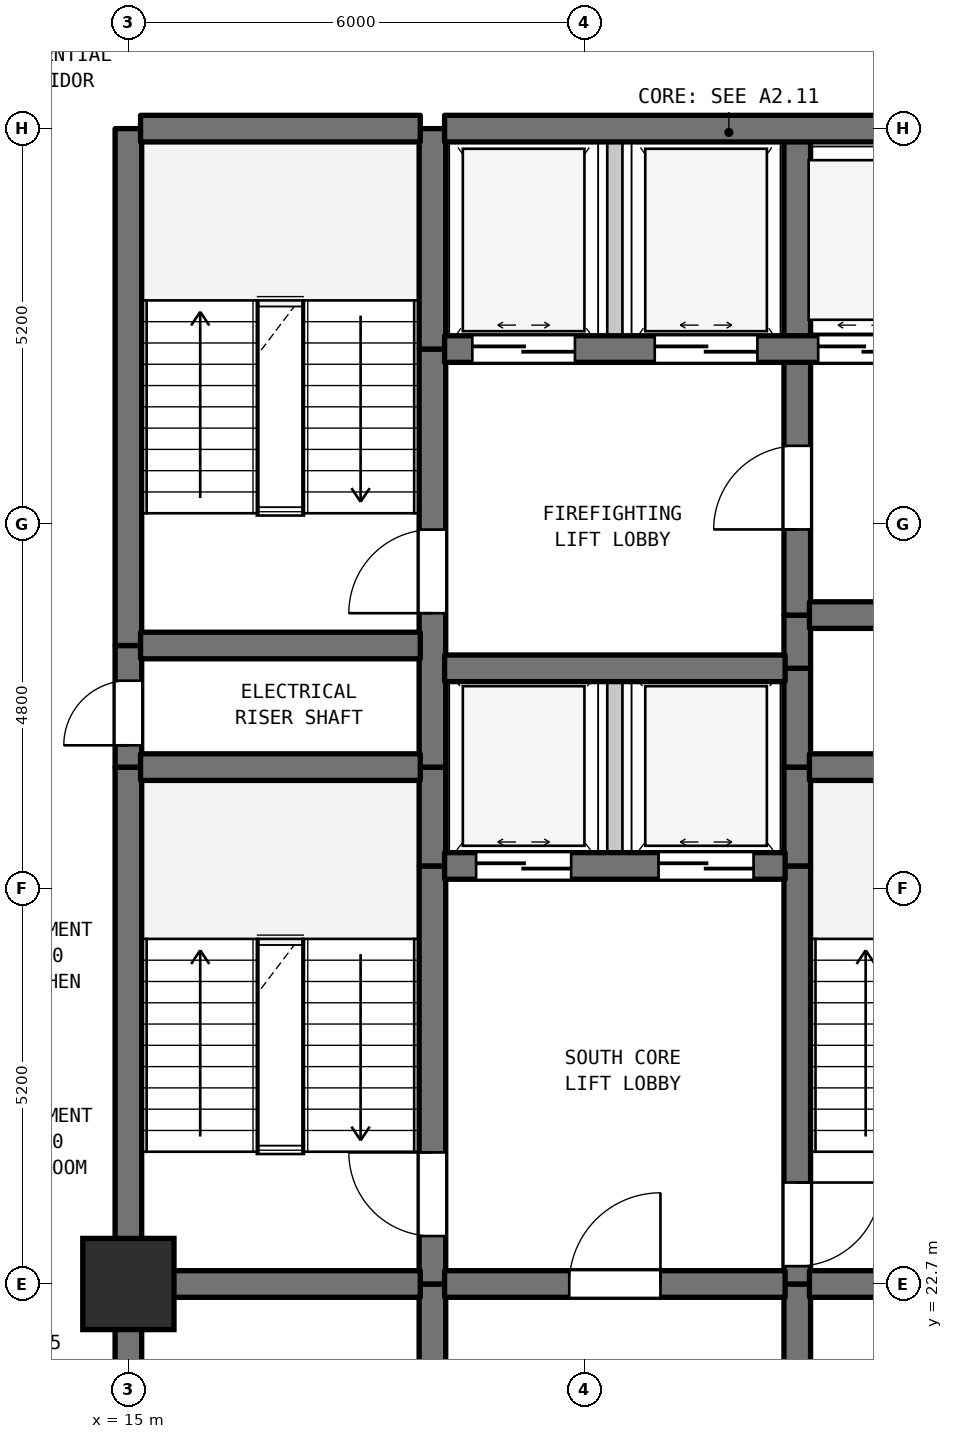
"""IFC4 building model, lengths in metres.
Left out: names, types, materials, properties, quantities, classifications, styles, units other than length and angle.
Written with IfcOpenShell. Run it as: python <this file> out.ifc"""

import sys

from ifc_helpers import new_model, si_unit, direction, frame, frame_2d, origin, origin_2d, place, context, subcontext, project, spatial, rectangle, extrude, element, fill, save


model = new_model("IFC4")
c1 = context("Model", 3, precision=1e-05, world=origin(), true_north=direction((0.0, 1.0)))
c2 = subcontext(c1, "Body", "Model", "MODEL_VIEW")
j1 = project(units=[si_unit("LENGTHUNIT", "METRE"), si_unit("PLANEANGLEUNIT", "RADIAN")], contexts=[c1])
p1 = place(None, origin())
s1 = spatial("IfcSite", under=j1, at=p1, CompositionType="ELEMENT")
p2 = place(p1, origin())
s2 = spatial("IfcBuilding", under=s1, at=p2, CompositionType="ELEMENT")
p3 = place(p2, frame((0.0, 0.0, 73.8)))
s3 = spatial("IfcBuildingStorey", under=s2, at=p3, CompositionType="ELEMENT", Elevation=73.8)
p4 = place(p3, frame((15.0, 22.7, 0.0), z_axis=(0.0, 0.0, 1.0), x_axis=(1.0, 0.0, 0.0)))
e1 = element("IfcColumn", 1, at=p4, inside=s3, PredefinedType="COLUMN", context=c2, shape_type="SweptSolid", body=[
    extrude(rectangle(XDim=1.2, YDim=1.2, at=origin_2d()), origin(), (0.0, 0.0, 1.0), 3.7),
])
p5 = place(p3, frame((15.0, 19.5, 0.0), z_axis=(0.0, 0.0, 1.0), x_axis=(0.0, 1.0, 0.0)))
e2 = element("IfcWall", 2, at=p5, inside=s3, PredefinedType="SHEAR", context=c2, shape_type="SweptSolid", body=[
    extrude(rectangle(XDim=3.2, YDim=0.35, at=frame_2d((1.6, 0.0))), origin(), (0.0, 0.0, 1.0), 3.385),
])
p6 = place(p3, frame((15.0, 22.7, 0.0), z_axis=(0.0, 0.0, 1.0), x_axis=(0.0, 1.0, 0.0)))
e3 = element("IfcWall", 3, at=p6, inside=s3, PredefinedType="SHEAR", context=c2, shape_type="SweptSolid", body=[
    extrude(rectangle(XDim=6.8, YDim=0.35, at=frame_2d((3.4, 0.0))), origin(), (0.0, 0.0, 1.0), 3.385),
])
p7 = place(p3, frame((15.0, 29.5, 0.0), z_axis=(0.0, 0.0, 1.0), x_axis=(0.0, 1.0, 0.0)))
e4 = element("IfcWall", 4, at=p7, inside=s3, PredefinedType="SHEAR", context=c2, shape_type="SweptSolid", body=[
    extrude(rectangle(XDim=1.6, YDim=0.35, at=frame_2d((0.8, 0.0))), origin(), (0.0, 0.0, 1.0), 3.385),
])
p8 = place(p7, frame((0.287, 0.0, 0.0)))
e5 = element("IfcOpeningElement", 5, at=p8, cuts=e4, PredefinedType="OPENING", context=c2, shape_type="SweptSolid", body=[
    extrude(rectangle(XDim=0.85, YDim=2.1, at=frame_2d((0.425, 1.05))), frame((0.0, 0.185, 0.0), z_axis=(0.0, -1.0, 0.0), x_axis=(1.0, 0.0, 0.0)), (0.0, 0.0, 1.0), 0.37),
])
p9 = place(p3, frame((15.0, 31.1, 0.0), z_axis=(0.0, 0.0, 1.0), x_axis=(0.0, 1.0, 0.0)))
e6 = element("IfcWall", 6, at=p9, inside=s3, PredefinedType="SHEAR", context=c2, shape_type="SweptSolid", body=[
    extrude(rectangle(XDim=6.8, YDim=0.35, at=frame_2d((3.4, 0.0))), origin(), (0.0, 0.0, 1.0), 3.385),
])
p10 = place(p3, frame((19.0, 19.5, 0.0), z_axis=(0.0, 0.0, 1.0), x_axis=(0.0, 1.0, 0.0)))
e7 = element("IfcWall", 7, at=p10, inside=s3, PredefinedType="SHEAR", context=c2, shape_type="SweptSolid", body=[
    extrude(rectangle(XDim=3.2, YDim=0.35, at=frame_2d((1.6, 0.0))), origin(), (0.0, 0.0, 1.0), 3.385),
])
p11 = place(p3, frame((19.0, 22.7, 0.0), z_axis=(0.0, 0.0, 1.0), x_axis=(0.0, 1.0, 0.0)))
e8 = element("IfcWall", 8, at=p11, inside=s3, PredefinedType="SHEAR", context=c2, shape_type="SweptSolid", body=[
    extrude(rectangle(XDim=5.5, YDim=0.35, at=frame_2d((2.75, 0.0))), origin(), (0.0, 0.0, 1.0), 3.385),
])
p12 = place(p11, frame((0.631, 0.0, 0.0)))
e9 = element("IfcOpeningElement", 9, at=p12, cuts=e8, PredefinedType="OPENING", context=c2, shape_type="SweptSolid", body=[
    extrude(rectangle(XDim=1.1, YDim=2.15, at=frame_2d((0.55, 1.075))), frame((0.0, 0.185, 0.0), z_axis=(0.0, -1.0, 0.0), x_axis=(1.0, 0.0, 0.0)), (0.0, 0.0, 1.0), 0.37),
])
p13 = place(p3, frame((19.0, 28.2, 0.0), z_axis=(0.0, 0.0, 1.0), x_axis=(0.0, 1.0, 0.0)))
e10 = element("IfcWall", 10, at=p13, inside=s3, PredefinedType="SHEAR", context=c2, shape_type="SweptSolid", body=[
    extrude(rectangle(XDim=1.3, YDim=0.35, at=frame_2d((0.65, 0.0))), origin(), (0.0, 0.0, 1.0), 3.385),
])
p14 = place(p3, frame((19.0, 29.5, 0.0), z_axis=(0.0, 0.0, 1.0), x_axis=(0.0, 1.0, 0.0)))
e11 = element("IfcWall", 11, at=p14, inside=s3, PredefinedType="SHEAR", context=c2, shape_type="SweptSolid", body=[
    extrude(rectangle(XDim=5.5, YDim=0.35, at=frame_2d((2.75, 0.0))), origin(), (0.0, 0.0, 1.0), 3.385),
])
p15 = place(p14, frame((2.025, 0.0, 0.0)))
e12 = element("IfcOpeningElement", 12, at=p15, cuts=e11, PredefinedType="OPENING", context=c2, shape_type="SweptSolid", body=[
    extrude(rectangle(XDim=1.1, YDim=2.15, at=frame_2d((0.55, 1.075))), frame((0.0, 0.185, 0.0), z_axis=(0.0, -1.0, 0.0), x_axis=(1.0, 0.0, 0.0)), (0.0, 0.0, 1.0), 0.37),
])
p16 = place(p3, frame((19.0, 35.0, 0.0), z_axis=(0.0, 0.0, 1.0), x_axis=(0.0, 1.0, 0.0)))
e13 = element("IfcWall", 13, at=p16, inside=s3, PredefinedType="SHEAR", context=c2, shape_type="SweptSolid", body=[
    extrude(rectangle(XDim=2.9, YDim=0.35, at=frame_2d((1.45, 0.0))), origin(), (0.0, 0.0, 1.0), 3.385),
])
p17 = place(p3, frame((21.4, 28.2, 0.0), z_axis=(0.0, 0.0, 1.0), x_axis=(0.0, 1.0, 0.0)))
e14 = element("IfcWall", 14, at=p17, inside=s3, PredefinedType="STANDARD", context=c2, shape_type="SweptSolid", body=[
    extrude(rectangle(XDim=2.6, YDim=0.2, at=frame_2d((1.3, 0.0))), origin(), (0.0, 0.0, 1.0), 3.385),
])
p18 = place(p3, frame((21.4, 35.0, 0.0), z_axis=(0.0, 0.0, 1.0), x_axis=(0.0, 1.0, 0.0)))
e15 = element("IfcWall", 15, at=p18, inside=s3, PredefinedType="STANDARD", context=c2, shape_type="SweptSolid", body=[
    extrude(rectangle(XDim=2.9, YDim=0.2, at=frame_2d((1.45, 0.0))), origin(), (0.0, 0.0, 1.0), 3.385),
])
p19 = place(p3, frame((23.8, 19.5, 0.0), z_axis=(0.0, 0.0, 1.0), x_axis=(0.0, 1.0, 0.0)))
e16 = element("IfcWall", 16, at=p19, inside=s3, PredefinedType="SHEAR", context=c2, shape_type="SweptSolid", body=[
    extrude(rectangle(XDim=3.2, YDim=0.35, at=frame_2d((1.6, 0.0))), origin(), (0.0, 0.0, 1.0), 3.385),
])
p20 = place(p3, frame((23.8, 22.7, 0.0), z_axis=(0.0, 0.0, 1.0), x_axis=(0.0, 1.0, 0.0)))
e17 = element("IfcWall", 17, at=p20, inside=s3, PredefinedType="SHEAR", context=c2, shape_type="SweptSolid", body=[
    extrude(rectangle(XDim=5.5, YDim=0.35, at=frame_2d((2.75, 0.0))), origin(), (0.0, 0.0, 1.0), 3.385),
])
p21 = place(p20, frame((0.235, 0.0, 0.0)))
e18 = element("IfcOpeningElement", 18, at=p21, cuts=e17, PredefinedType="OPENING", context=c2, shape_type="SweptSolid", body=[
    extrude(rectangle(XDim=1.1, YDim=2.15, at=frame_2d((0.55, 1.075))), frame((0.0, 0.185, 0.0), z_axis=(0.0, -1.0, 0.0), x_axis=(1.0, 0.0, 0.0)), (0.0, 0.0, 1.0), 0.37),
])
for number, where, z_axis, x_axis in (
    (19, (23.8, 28.2, 0.0), (0.0, 0.0, 1.0), (0.0, 1.0, 0.0)),
    (20, (23.8, 29.5, 0.0), (0.0, 0.0, 1.0), (0.0, 1.0, 0.0)),
):
    element("IfcWall", number, at=place(p3, frame(where, z_axis=z_axis, x_axis=x_axis)), inside=s3, PredefinedType="SHEAR", context=c2, shape_type="SweptSolid", body=[
        extrude(rectangle(XDim=1.3, YDim=0.35, at=frame_2d((0.65, 0.0))), origin(), (0.0, 0.0, 1.0), 3.385),
    ])
p22 = place(p3, frame((23.8, 30.8, 0.0), z_axis=(0.0, 0.0, 1.0), x_axis=(0.0, 1.0, 0.0)))
e21 = element("IfcWall", 21, at=p22, inside=s3, PredefinedType="SHEAR", context=c2, shape_type="SweptSolid", body=[
    extrude(rectangle(XDim=0.7, YDim=0.35, at=frame_2d((0.35, 0.0))), origin(), (0.0, 0.0, 1.0), 3.385),
])
p23 = place(p3, frame((23.8, 31.5, 0.0), z_axis=(0.0, 0.0, 1.0), x_axis=(0.0, 1.0, 0.0)))
e22 = element("IfcWall", 22, at=p23, inside=s3, PredefinedType="SHEAR", context=c2, shape_type="SweptSolid", body=[
    extrude(rectangle(XDim=3.5, YDim=0.35, at=frame_2d((1.75, 0.0))), origin(), (0.0, 0.0, 1.0), 3.385),
])
p24 = place(p23, frame((1.127, 0.0, 0.0)))
e23 = element("IfcOpeningElement", 23, at=p24, cuts=e22, PredefinedType="OPENING", context=c2, shape_type="SweptSolid", body=[
    extrude(rectangle(XDim=1.1, YDim=2.15, at=frame_2d((0.55, 1.075))), frame((0.0, 0.185, 0.0), z_axis=(0.0, -1.0, 0.0), x_axis=(1.0, 0.0, 0.0)), (0.0, 0.0, 1.0), 0.37),
])
p25 = place(p3, frame((23.8, 35.0, 0.0), z_axis=(0.0, 0.0, 1.0), x_axis=(0.0, 1.0, 0.0)))
e24 = element("IfcWall", 24, at=p25, inside=s3, PredefinedType="SHEAR", context=c2, shape_type="SweptSolid", body=[
    extrude(rectangle(XDim=2.9, YDim=0.35, at=frame_2d((1.45, 0.0))), origin(), (0.0, 0.0, 1.0), 3.385),
])
p26 = place(p3, frame((15.16, 22.7, 0.0), z_axis=(0.0, 0.0, 1.0), x_axis=(1.0, 0.0, 0.0)))
e25 = element("IfcWall", 25, at=p26, inside=s3, PredefinedType="SHEAR", context=c2, shape_type="SweptSolid", body=[
    extrude(rectangle(XDim=3.68, YDim=0.35, at=frame_2d((1.84, 0.0))), origin(), (0.0, 0.0, 1.0), 3.385),
])
p27 = place(p3, frame((19.16, 22.7, 0.0), z_axis=(0.0, 0.0, 1.0), x_axis=(1.0, 0.0, 0.0)))
e26 = element("IfcWall", 26, at=p27, inside=s3, PredefinedType="SHEAR", context=c2, shape_type="SweptSolid", body=[
    extrude(rectangle(XDim=4.48, YDim=0.35, at=frame_2d((2.24, 0.0))), origin(), (0.0, 0.0, 1.0), 3.385),
])
p28 = place(p27, frame((1.64, 0.0, 0.0)))
e27 = element("IfcOpeningElement", 27, at=p28, cuts=e26, PredefinedType="OPENING", context=c2, shape_type="SweptSolid", body=[
    extrude(rectangle(XDim=1.2, YDim=2.2, at=frame_2d((0.6, 1.1))), frame((0.0, 0.185, 0.0), z_axis=(0.0, -1.0, 0.0), x_axis=(1.0, 0.0, 0.0)), (0.0, 0.0, 1.0), 0.37),
])
p29 = place(p3, frame((23.96, 22.7, 0.0), z_axis=(0.0, 0.0, 1.0), x_axis=(1.0, 0.0, 0.0)))
e28 = element("IfcWall", 28, at=p29, inside=s3, PredefinedType="SHEAR", context=c2, shape_type="SweptSolid", body=[
    extrude(rectangle(XDim=3.18, YDim=0.35, at=frame_2d((1.59, 0.0))), origin(), (0.0, 0.0, 1.0), 3.385),
])
p30 = place(p3, frame((19.16, 28.2, 0.0), z_axis=(0.0, 0.0, 1.0), x_axis=(1.0, 0.0, 0.0)))
e29 = element("IfcWall", 29, at=p30, inside=s3, PredefinedType="SHEAR", context=c2, shape_type="SweptSolid", body=[
    extrude(rectangle(XDim=4.48, YDim=0.35, at=frame_2d((2.24, 0.0))), origin(), (0.0, 0.0, 1.0), 3.385),
])
p31 = place(p30, frame((0.415, 0.0, 0.0)))
e30 = element("IfcOpeningElement", 30, at=p31, cuts=e29, PredefinedType="OPENING", context=c2, shape_type="SweptSolid", body=[
    extrude(rectangle(XDim=1.25, YDim=2.2, at=frame_2d((0.625, 1.1))), frame((0.0, 0.185, 0.0), z_axis=(0.0, -1.0, 0.0), x_axis=(1.0, 0.0, 0.0)), (0.0, 0.0, 1.0), 0.37),
])
p32 = place(p30, frame((2.815, 0.0, 0.0)))
e31 = element("IfcOpeningElement", 31, at=p32, cuts=e29, PredefinedType="OPENING", context=c2, shape_type="SweptSolid", body=[
    extrude(rectangle(XDim=1.25, YDim=2.2, at=frame_2d((0.625, 1.1))), frame((0.0, 0.185, 0.0), z_axis=(0.0, -1.0, 0.0), x_axis=(1.0, 0.0, 0.0)), (0.0, 0.0, 1.0), 0.37),
])
p33 = place(p3, frame((15.16, 29.5, 0.0), z_axis=(0.0, 0.0, 1.0), x_axis=(1.0, 0.0, 0.0)))
e32 = element("IfcWall", 32, at=p33, inside=s3, PredefinedType="SHEAR", context=c2, shape_type="SweptSolid", body=[
    extrude(rectangle(XDim=3.68, YDim=0.35, at=frame_2d((1.84, 0.0))), origin(), (0.0, 0.0, 1.0), 3.385),
])
p34 = place(p3, frame((23.96, 29.5, 0.0), z_axis=(0.0, 0.0, 1.0), x_axis=(1.0, 0.0, 0.0)))
e33 = element("IfcWall", 33, at=p34, inside=s3, PredefinedType="SHEAR", context=c2, shape_type="SweptSolid", body=[
    extrude(rectangle(XDim=3.18, YDim=0.35, at=frame_2d((1.59, 0.0))), origin(), (0.0, 0.0, 1.0), 3.385),
])
p35 = place(p3, frame((19.16, 30.8, 0.0), z_axis=(0.0, 0.0, 1.0), x_axis=(1.0, 0.0, 0.0)))
e34 = element("IfcWall", 34, at=p35, inside=s3, PredefinedType="SHEAR", context=c2, shape_type="SweptSolid", body=[
    extrude(rectangle(XDim=4.48, YDim=0.35, at=frame_2d((2.24, 0.0))), origin(), (0.0, 0.0, 1.0), 3.385),
])
p36 = place(p3, frame((15.16, 31.1, 0.0), z_axis=(0.0, 0.0, 1.0), x_axis=(1.0, 0.0, 0.0)))
e35 = element("IfcWall", 35, at=p36, inside=s3, PredefinedType="SHEAR", context=c2, shape_type="SweptSolid", body=[
    extrude(rectangle(XDim=3.68, YDim=0.35, at=frame_2d((1.84, 0.0))), origin(), (0.0, 0.0, 1.0), 3.385),
])
p37 = place(p3, frame((23.96, 31.5, 0.0), z_axis=(0.0, 0.0, 1.0), x_axis=(1.0, 0.0, 0.0)))
e36 = element("IfcWall", 36, at=p37, inside=s3, PredefinedType="SHEAR", context=c2, shape_type="SweptSolid", body=[
    extrude(rectangle(XDim=3.18, YDim=0.35, at=frame_2d((1.59, 0.0))), origin(), (0.0, 0.0, 1.0), 3.385),
])
p38 = place(p37, frame((1.094, 0.0, 0.0)))
e37 = element("IfcOpeningElement", 37, at=p38, cuts=e36, PredefinedType="OPENING", context=c2, shape_type="SweptSolid", body=[
    extrude(rectangle(XDim=0.85, YDim=2.1, at=frame_2d((0.425, 1.05))), frame((0.0, 0.185, 0.0), z_axis=(0.0, -1.0, 0.0), x_axis=(1.0, 0.0, 0.0)), (0.0, 0.0, 1.0), 0.37),
])
p39 = place(p3, frame((19.16, 35.0, 0.0), z_axis=(0.0, 0.0, 1.0), x_axis=(1.0, 0.0, 0.0)))
e38 = element("IfcWall", 38, at=p39, inside=s3, PredefinedType="SHEAR", context=c2, shape_type="SweptSolid", body=[
    extrude(rectangle(XDim=11.48, YDim=0.35, at=frame_2d((5.74, 0.0))), origin(), (0.0, 0.0, 1.0), 3.385),
])
p40 = place(p39, frame((0.365, 0.0, 0.0)))
e39 = element("IfcOpeningElement", 39, at=p40, cuts=e38, PredefinedType="OPENING", context=c2, shape_type="SweptSolid", body=[
    extrude(rectangle(XDim=1.35, YDim=2.2, at=frame_2d((0.675, 1.1))), frame((0.0, 0.185, 0.0), z_axis=(0.0, -1.0, 0.0), x_axis=(1.0, 0.0, 0.0)), (0.0, 0.0, 1.0), 0.37),
])
p41 = place(p39, frame((2.765, 0.0, 0.0)))
e40 = element("IfcOpeningElement", 40, at=p41, cuts=e38, PredefinedType="OPENING", context=c2, shape_type="SweptSolid", body=[
    extrude(rectangle(XDim=1.35, YDim=2.2, at=frame_2d((0.675, 1.1))), frame((0.0, 0.185, 0.0), z_axis=(0.0, -1.0, 0.0), x_axis=(1.0, 0.0, 0.0)), (0.0, 0.0, 1.0), 0.37),
])
p42 = place(p39, frame((4.915, 0.0, 0.0)))
e41 = element("IfcOpeningElement", 41, at=p42, cuts=e38, PredefinedType="OPENING", context=c2, shape_type="SweptSolid", body=[
    extrude(rectangle(XDim=1.2, YDim=2.2, at=frame_2d((0.6, 1.1))), frame((0.0, 0.185, 0.0), z_axis=(0.0, -1.0, 0.0), x_axis=(1.0, 0.0, 0.0)), (0.0, 0.0, 1.0), 0.37),
])
p43 = place(p39, frame((6.665, 0.0, 0.0)))
e42 = element("IfcOpeningElement", 42, at=p43, cuts=e38, PredefinedType="OPENING", context=c2, shape_type="SweptSolid", body=[
    extrude(rectangle(XDim=1.2, YDim=2.2, at=frame_2d((0.6, 1.1))), frame((0.0, 0.185, 0.0), z_axis=(0.0, -1.0, 0.0), x_axis=(1.0, 0.0, 0.0)), (0.0, 0.0, 1.0), 0.37),
])
p44 = place(p39, frame((8.415, 0.0, 0.0)))
e43 = element("IfcOpeningElement", 43, at=p44, cuts=e38, PredefinedType="OPENING", context=c2, shape_type="SweptSolid", body=[
    extrude(rectangle(XDim=1.2, YDim=2.2, at=frame_2d((0.6, 1.1))), frame((0.0, 0.185, 0.0), z_axis=(0.0, -1.0, 0.0), x_axis=(1.0, 0.0, 0.0)), (0.0, 0.0, 1.0), 0.37),
])
p45 = place(p39, frame((10.16, 0.0, 0.0)))
e44 = element("IfcOpeningElement", 44, at=p45, cuts=e38, PredefinedType="OPENING", context=c2, shape_type="SweptSolid", body=[
    extrude(rectangle(XDim=1.2, YDim=2.2, at=frame_2d((0.6, 1.1))), frame((0.0, 0.185, 0.0), z_axis=(0.0, -1.0, 0.0), x_axis=(1.0, 0.0, 0.0)), (0.0, 0.0, 1.0), 0.37),
])
p46 = place(p3, frame((15.16, 37.9, 0.0), z_axis=(0.0, 0.0, 1.0), x_axis=(1.0, 0.0, 0.0)))
e45 = element("IfcWall", 45, at=p46, inside=s3, PredefinedType="SHEAR", context=c2, shape_type="SweptSolid", body=[
    extrude(rectangle(XDim=3.68, YDim=0.35, at=frame_2d((1.84, 0.0))), origin(), (0.0, 0.0, 1.0), 3.385),
])
p47 = place(p3, frame((19.16, 37.9, 0.0), z_axis=(0.0, 0.0, 1.0), x_axis=(1.0, 0.0, 0.0)))
e46 = element("IfcWall", 46, at=p47, inside=s3, PredefinedType="SHEAR", context=c2, shape_type="SweptSolid", body=[
    extrude(rectangle(XDim=11.48, YDim=0.35, at=frame_2d((5.74, 0.0))), origin(), (0.0, 0.0, 1.0), 3.385),
])
p48 = place(p8, origin())
e47 = element("IfcDoor", 47, at=p48, inside=s3, OperationType="SINGLE_SWING_LEFT", PredefinedType="DOOR", context=c2, shape_type="SweptSolid", body=[
    extrude(rectangle(XDim=0.85, YDim=2.1, at=frame_2d((0.425, 1.05))), frame((0.0, 0.025, 0.0), z_axis=(0.0, -1.0, 0.0), x_axis=(1.0, 0.0, 0.0)), (0.0, 0.0, 1.0), 0.05),
])
fill(e5, e47)
p49 = place(p12, origin())
e48 = element("IfcDoor", 48, at=p49, inside=s3, OperationType="SINGLE_SWING_RIGHT", PredefinedType="DOOR", context=c2, shape_type="SweptSolid", body=[
    extrude(rectangle(XDim=1.1, YDim=2.15, at=frame_2d((0.55, 1.075))), frame((0.0, 0.025, 0.0), z_axis=(0.0, -1.0, 0.0), x_axis=(1.0, 0.0, 0.0)), (0.0, 0.0, 1.0), 0.05),
])
fill(e9, e48)
p50 = place(p15, origin())
e49 = element("IfcDoor", 49, at=p50, inside=s3, OperationType="SINGLE_SWING_LEFT", PredefinedType="DOOR", context=c2, shape_type="SweptSolid", body=[
    extrude(rectangle(XDim=1.1, YDim=2.15, at=frame_2d((0.55, 1.075))), frame((0.0, 0.025, 0.0), z_axis=(0.0, -1.0, 0.0), x_axis=(1.0, 0.0, 0.0)), (0.0, 0.0, 1.0), 0.05),
])
fill(e12, e49)
p51 = place(p21, frame((1.1, 0.0, 0.0), z_axis=(0.0, 0.0, 1.0), x_axis=(-1.0, 0.0, 0.0)))
e50 = element("IfcDoor", 50, at=p51, inside=s3, OperationType="SINGLE_SWING_RIGHT", PredefinedType="DOOR", context=c2, shape_type="SweptSolid", body=[
    extrude(rectangle(XDim=1.1, YDim=2.15, at=frame_2d((0.55, 1.075))), frame((0.0, 0.025, 0.0), z_axis=(0.0, -1.0, 0.0), x_axis=(1.0, 0.0, 0.0)), (0.0, 0.0, 1.0), 0.05),
])
fill(e18, e50)
p52 = place(p24, origin())
e51 = element("IfcDoor", 51, at=p52, inside=s3, OperationType="SINGLE_SWING_LEFT", PredefinedType="DOOR", context=c2, shape_type="SweptSolid", body=[
    extrude(rectangle(XDim=1.1, YDim=2.15, at=frame_2d((0.55, 1.075))), frame((0.0, 0.025, 0.0), z_axis=(0.0, -1.0, 0.0), x_axis=(1.0, 0.0, 0.0)), (0.0, 0.0, 1.0), 0.05),
])
fill(e23, e51)
p53 = place(p28, origin())
e52 = element("IfcDoor", 52, at=p53, inside=s3, OperationType="SINGLE_SWING_RIGHT", PredefinedType="DOOR", context=c2, shape_type="SweptSolid", body=[
    extrude(rectangle(XDim=1.2, YDim=2.2, at=frame_2d((0.6, 1.1))), frame((0.0, 0.025, 0.0), z_axis=(0.0, -1.0, 0.0), x_axis=(1.0, 0.0, 0.0)), (0.0, 0.0, 1.0), 0.05),
])
fill(e27, e52)
p54 = place(p31, origin())
e53 = element("IfcDoor", 53, at=p54, inside=s3, OperationType="DOUBLE_DOOR_SLIDING", PredefinedType="DOOR", context=c2, shape_type="SweptSolid", body=[
    extrude(rectangle(XDim=1.25, YDim=2.2, at=frame_2d((0.625, 1.1))), frame((0.0, 0.025, 0.0), z_axis=(0.0, -1.0, 0.0), x_axis=(1.0, 0.0, 0.0)), (0.0, 0.0, 1.0), 0.05),
])
fill(e30, e53)
p55 = place(p32, origin())
e54 = element("IfcDoor", 54, at=p55, inside=s3, OperationType="DOUBLE_DOOR_SLIDING", PredefinedType="DOOR", context=c2, shape_type="SweptSolid", body=[
    extrude(rectangle(XDim=1.25, YDim=2.2, at=frame_2d((0.625, 1.1))), frame((0.0, 0.025, 0.0), z_axis=(0.0, -1.0, 0.0), x_axis=(1.0, 0.0, 0.0)), (0.0, 0.0, 1.0), 0.05),
])
fill(e31, e54)
p56 = place(p40, origin())
e55 = element("IfcDoor", 55, at=p56, inside=s3, OperationType="DOUBLE_DOOR_SLIDING", PredefinedType="DOOR", context=c2, shape_type="SweptSolid", body=[
    extrude(rectangle(XDim=1.35, YDim=2.2, at=frame_2d((0.675, 1.1))), frame((0.0, 0.025, 0.0), z_axis=(0.0, -1.0, 0.0), x_axis=(1.0, 0.0, 0.0)), (0.0, 0.0, 1.0), 0.05),
])
fill(e39, e55)
p57 = place(p41, origin())
e56 = element("IfcDoor", 56, at=p57, inside=s3, OperationType="DOUBLE_DOOR_SLIDING", PredefinedType="DOOR", context=c2, shape_type="SweptSolid", body=[
    extrude(rectangle(XDim=1.35, YDim=2.2, at=frame_2d((0.675, 1.1))), frame((0.0, 0.025, 0.0), z_axis=(0.0, -1.0, 0.0), x_axis=(1.0, 0.0, 0.0)), (0.0, 0.0, 1.0), 0.05),
])
fill(e40, e56)
p58 = place(p42, origin())
e57 = element("IfcDoor", 57, at=p58, inside=s3, OperationType="DOUBLE_DOOR_SLIDING", PredefinedType="DOOR", context=c2, shape_type="SweptSolid", body=[
    extrude(rectangle(XDim=1.2, YDim=2.2, at=frame_2d((0.6, 1.1))), frame((0.0, 0.025, 0.0), z_axis=(0.0, -1.0, 0.0), x_axis=(1.0, 0.0, 0.0)), (0.0, 0.0, 1.0), 0.05),
])
fill(e41, e57)
save(model, sys.argv[1])
